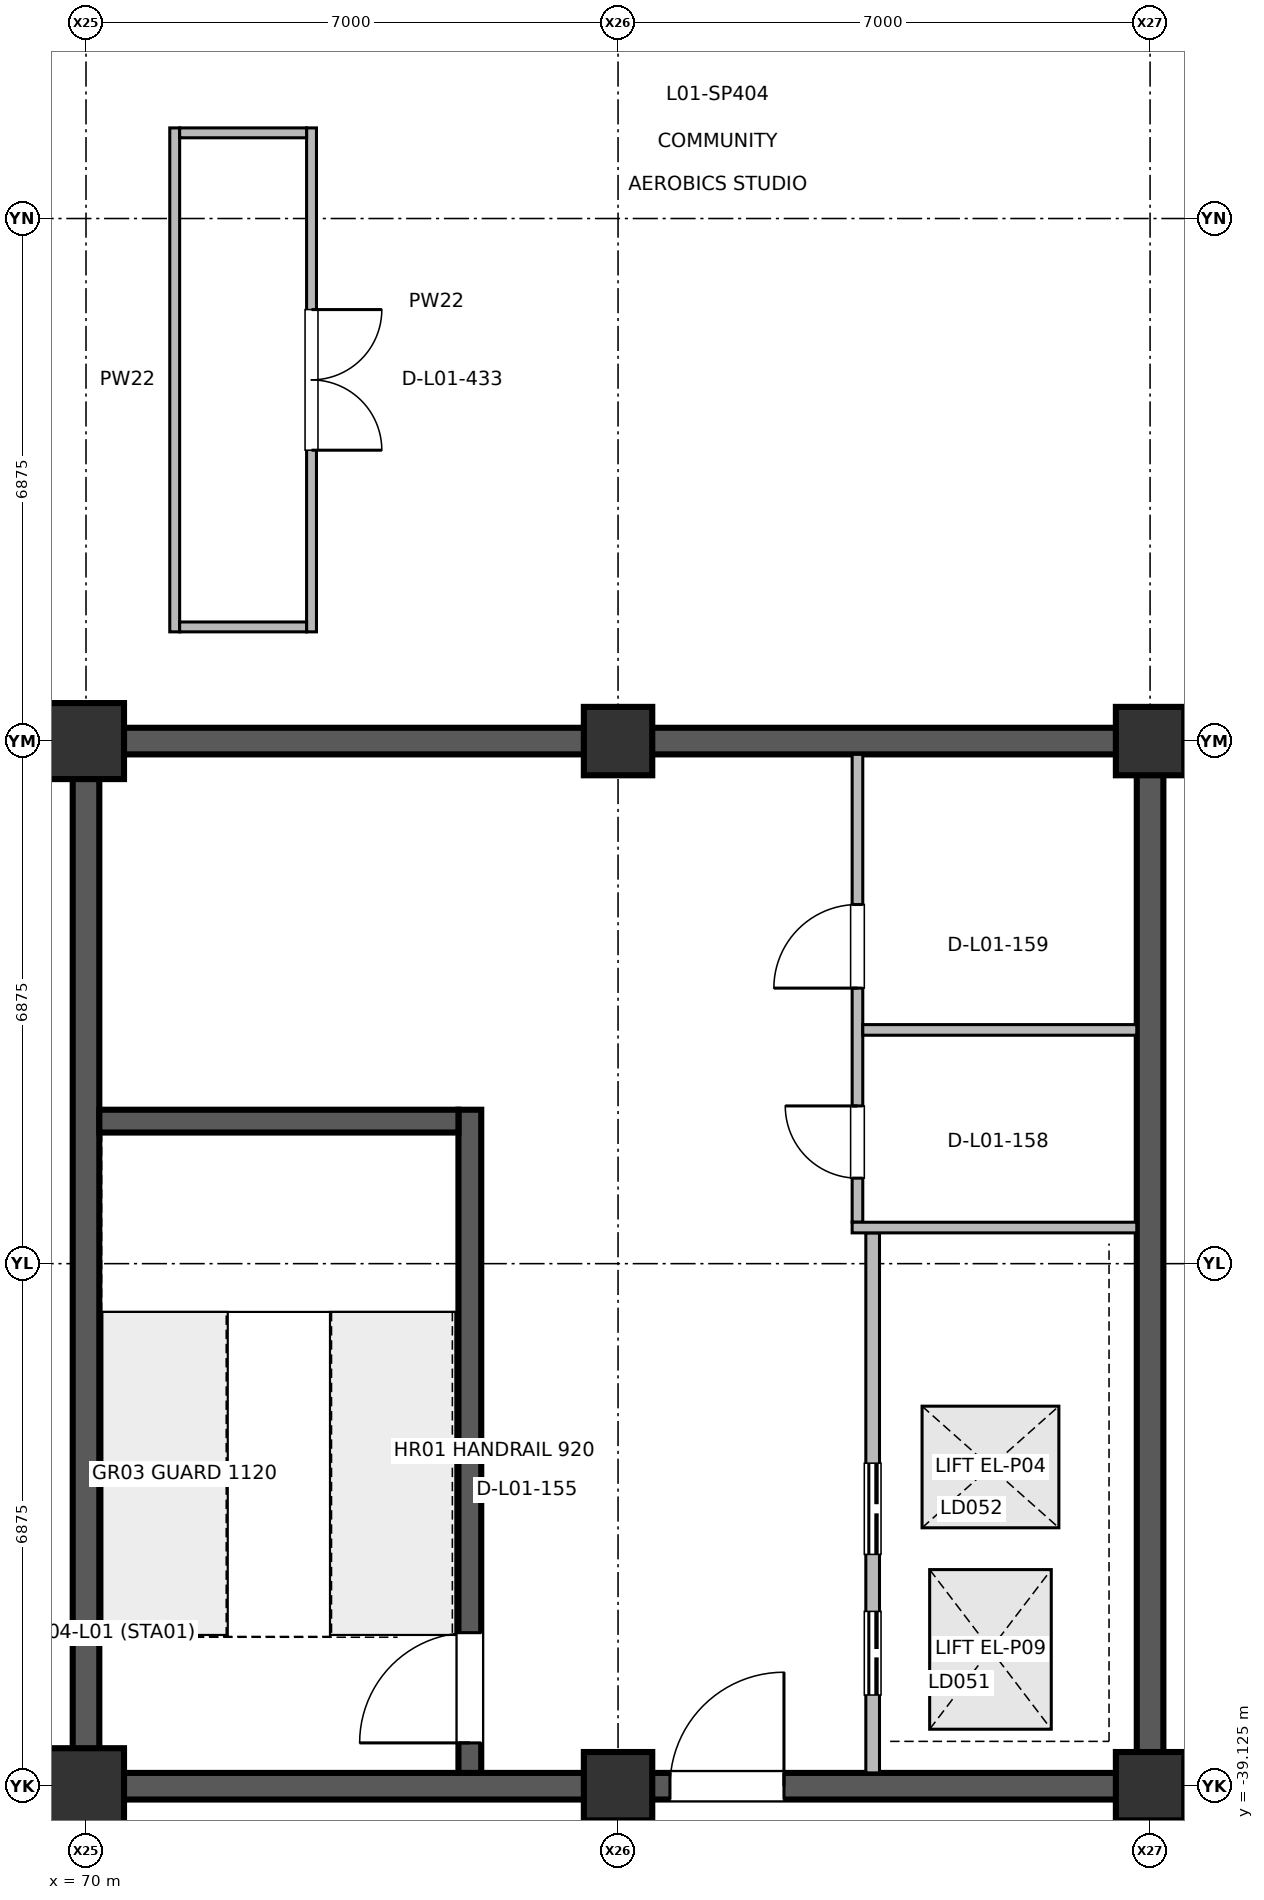
"""IFC4 building model, lengths in metres.
Left out: names, types, materials, properties, quantities, classifications, styles, units other than length and angle.
Written with IfcOpenShell. Run it as: python <this file> out.ifc"""

import sys

from ifc_helpers import new_model, si_unit, direction, frame, frame_2d, origin, origin_2d, place, context, subcontext, project, spatial, rectangle, extrude, element, fill, save


model = new_model("IFC4")
c1 = context("Model", 3, precision=1e-05, world=origin(), true_north=direction((0.0, 1.0)))
c2 = subcontext(c1, "Body", "Model", "MODEL_VIEW")
j1 = project(units=[si_unit("LENGTHUNIT", "METRE"), si_unit("PLANEANGLEUNIT", "RADIAN")], contexts=[c1])
p1 = place(None, origin())
s1 = spatial("IfcSite", under=j1, at=p1, CompositionType="ELEMENT")
p2 = place(p1, origin())
s2 = spatial("IfcBuilding", under=s1, at=p2, CompositionType="ELEMENT")
p3 = place(p2, origin())
s3 = spatial("IfcBuildingStorey", under=s2, at=p3, CompositionType="ELEMENT", Elevation=0.0)
for number, where, z_axis, x_axis in (
    (1, (70.0, -39.125, 0.0), (0.0, 0.0, 1.0), (1.0, 0.0, 0.0)),
    (2, (70.0, -25.375, 0.0), (0.0, 0.0, 1.0), (1.0, 0.0, 0.0)),
):
    element("IfcColumn", number, at=place(p3, frame(where, z_axis=z_axis, x_axis=x_axis)), inside=s3, PredefinedType="COLUMN", context=c2, shape_type="SweptSolid", body=[
        extrude(rectangle(XDim=1.0, YDim=1.0, at=origin_2d()), origin(), (0.0, 0.0, 1.0), 5.998),
    ])
for number, where, z_axis, x_axis in (
    (3, (77.0, -39.125, 0.0), (0.0, 0.0, 1.0), (1.0, 0.0, 0.0)),
    (4, (77.0, -25.375, 0.0), (0.0, 0.0, 1.0), (1.0, 0.0, 0.0)),
    (5, (84.0, -39.125, 0.0), (0.0, 0.0, 1.0), (1.0, 0.0, 0.0)),
    (6, (84.0, -25.375, 0.0), (0.0, 0.0, 1.0), (1.0, 0.0, 0.0)),
):
    element("IfcColumn", number, at=place(p3, frame(where, z_axis=z_axis, x_axis=x_axis)), inside=s3, PredefinedType="COLUMN", context=c2, shape_type="SweptSolid", body=[
        extrude(rectangle(XDim=0.9, YDim=0.9, at=origin_2d()), origin(), (0.0, 0.0, 1.0), 5.998),
    ])
for number, where, z_axis, x_axis in (
    (7, (70.0, -38.95, 0.0), (0.0, 0.0, 1.0), (0.0, 1.0, 0.0)),
    (8, (84.0, -38.95, 0.0), (0.0, 0.0, 1.0), (0.0, 1.0, 0.0)),
):
    element("IfcWall", number, at=place(p3, frame(where, z_axis=z_axis, x_axis=x_axis)), inside=s3, PredefinedType="SHEAR", context=c2, shape_type="SweptSolid", body=[
        extrude(rectangle(XDim=13.4, YDim=0.35, at=frame_2d((6.7, 0.0))), origin(), (0.0, 0.0, 1.0), 5.75),
    ])
p4 = place(p3, frame((70.175, -39.125, 0.0), z_axis=(0.0, 0.0, 1.0), x_axis=(1.0, 0.0, 0.0)))
e9 = element("IfcWall", 9, at=p4, inside=s3, PredefinedType="SHEAR", context=c2, shape_type="SweptSolid", body=[
    extrude(rectangle(XDim=13.65, YDim=0.35, at=frame_2d((6.825, 0.0))), origin(), (0.0, 0.0, 1.0), 5.75),
])
p5 = place(p4, frame((7.508, 0.0, 0.0)))
e10 = element("IfcOpeningElement", 10, at=p5, cuts=e9, PredefinedType="OPENING", context=c2, shape_type="SweptSolid", body=[
    extrude(rectangle(XDim=1.5, YDim=2.2, at=frame_2d((0.75, 1.1))), frame((0.0, 0.185, 0.0), z_axis=(0.0, -1.0, 0.0), x_axis=(1.0, 0.0, 0.0)), (0.0, 0.0, 1.0), 0.37),
])
p6 = place(p3, frame((70.175, -25.375, 0.0), z_axis=(0.0, 0.0, 1.0), x_axis=(1.0, 0.0, 0.0)))
e11 = element("IfcWall", 11, at=p6, inside=s3, PredefinedType="SHEAR", context=c2, shape_type="SweptSolid", body=[
    extrude(rectangle(XDim=13.65, YDim=0.35, at=frame_2d((6.825, 0.0))), origin(), (0.0, 0.0, 1.0), 5.75),
])
p7 = place(p3, frame((75.05, -38.95, 0.0), z_axis=(0.0, 0.0, 1.0), x_axis=(0.0, 1.0, 0.0)))
e12 = element("IfcWall", 12, at=p7, inside=s3, PredefinedType="SHEAR", context=c2, shape_type="SweptSolid", body=[
    extrude(rectangle(XDim=8.725, YDim=0.3, at=frame_2d((4.362, 0.0))), origin(), (0.0, 0.0, 1.0), 5.75),
])
p8 = place(p7, frame((0.395, 0.0, 0.0)))
e13 = element("IfcOpeningElement", 13, at=p8, cuts=e12, PredefinedType="OPENING", context=c2, shape_type="SweptSolid", body=[
    extrude(rectangle(XDim=1.45, YDim=2.2, at=frame_2d((0.725, 1.1))), frame((0.0, 0.16, 0.0), z_axis=(0.0, -1.0, 0.0), x_axis=(1.0, 0.0, 0.0)), (0.0, 0.0, 1.0), 0.32),
])
p9 = place(p3, frame((80.35, -38.95, 0.0), z_axis=(0.0, 0.0, 1.0), x_axis=(0.0, 1.0, 0.0)))
e14 = element("IfcWall", 14, at=p9, inside=s3, PredefinedType="PARTITIONING", context=c2, shape_type="SweptSolid", body=[
    extrude(rectangle(XDim=7.105, YDim=0.18, at=frame_2d((3.552, 0.0))), origin(), (0.0, 0.0, 1.0), 5.02),
])
p10 = place(p9, frame((1.025, 0.0, 0.0)))
e15 = element("IfcOpeningElement", 15, at=p10, cuts=e14, PredefinedType="OPENING", context=c2, shape_type="SweptSolid", body=[
    extrude(rectangle(XDim=1.1, YDim=2.2, at=frame_2d((0.55, 1.1))), frame((0.0, 0.1, 0.0), z_axis=(0.0, -1.0, 0.0), x_axis=(1.0, 0.0, 0.0)), (0.0, 0.0, 1.0), 0.2),
])
p11 = place(p9, frame((2.875, 0.0, 0.0)))
e16 = element("IfcOpeningElement", 16, at=p11, cuts=e14, PredefinedType="OPENING", context=c2, shape_type="SweptSolid", body=[
    extrude(rectangle(XDim=1.2, YDim=2.25, at=frame_2d((0.6, 1.125))), frame((0.0, 0.1, 0.0), z_axis=(0.0, -1.0, 0.0), x_axis=(1.0, 0.0, 0.0)), (0.0, 0.0, 1.0), 0.2),
])
p12 = place(p3, frame((80.15, -31.705, 0.0), z_axis=(0.0, 0.0, 1.0), x_axis=(0.0, 1.0, 0.0)))
e17 = element("IfcWall", 17, at=p12, inside=s3, PredefinedType="PARTITIONING", context=c2, shape_type="SweptSolid", body=[
    extrude(rectangle(XDim=6.155, YDim=0.14, at=frame_2d((3.078, 0.0))), origin(), (0.0, 0.0, 1.0), 5.02),
])
p13 = place(p12, frame((0.58, 0.0, 0.0)))
e18 = element("IfcOpeningElement", 18, at=p13, cuts=e17, PredefinedType="OPENING", context=c2, shape_type="SweptSolid", body=[
    extrude(rectangle(XDim=0.95, YDim=2.15, at=frame_2d((0.475, 1.075))), frame((0.0, 0.08, 0.0), z_axis=(0.0, -1.0, 0.0), x_axis=(1.0, 0.0, 0.0)), (0.0, 0.0, 1.0), 0.16),
])
p14 = place(p12, frame((3.08, 0.0, 0.0)))
e19 = element("IfcOpeningElement", 19, at=p14, cuts=e17, PredefinedType="OPENING", context=c2, shape_type="SweptSolid", body=[
    extrude(rectangle(XDim=1.1, YDim=2.15, at=frame_2d((0.55, 1.075))), frame((0.0, 0.08, 0.0), z_axis=(0.0, -1.0, 0.0), x_axis=(1.0, 0.0, 0.0)), (0.0, 0.0, 1.0), 0.16),
])
p15 = place(p3, frame((72.967, -17.308, 0.0), z_axis=(0.0, 0.0, 1.0), x_axis=(0.0, -1.0, 0.0)))
e20 = element("IfcWall", 20, at=p15, inside=s3, PredefinedType="PARTITIONING", context=c2, shape_type="SweptSolid", body=[
    extrude(rectangle(XDim=6.63, YDim=0.13, at=frame_2d((3.315, 0.0))), origin(), (0.0, 0.0, 1.0), 5.02),
])
p16 = place(p15, frame((2.39, 0.0, 0.0)))
e21 = element("IfcOpeningElement", 21, at=p16, cuts=e20, PredefinedType="OPENING", context=c2, shape_type="SweptSolid", body=[
    extrude(rectangle(XDim=1.85, YDim=2.4, at=frame_2d((0.925, 1.2))), frame((0.0, 0.075, 0.0), z_axis=(0.0, -1.0, 0.0), x_axis=(1.0, 0.0, 0.0)), (0.0, 0.0, 1.0), 0.15),
])
p17 = place(p3, frame((80.08, -31.775, 0.0), z_axis=(0.0, 0.0, 1.0), x_axis=(1.0, 0.0, 0.0)))
e22 = element("IfcWall", 22, at=p17, inside=s3, PredefinedType="PARTITIONING", context=c2, shape_type="SweptSolid", body=[
    extrude(rectangle(XDim=3.745, YDim=0.14, at=frame_2d((1.873, 0.0))), origin(), (0.0, 0.0, 1.0), 5.02),
])
p18 = place(p3, frame((80.22, -29.175, 0.0), z_axis=(0.0, 0.0, 1.0), x_axis=(1.0, 0.0, 0.0)))
e23 = element("IfcWall", 23, at=p18, inside=s3, PredefinedType="PARTITIONING", context=c2, shape_type="SweptSolid", body=[
    extrude(rectangle(XDim=3.605, YDim=0.14, at=frame_2d((1.802, 0.0))), origin(), (0.0, 0.0, 1.0), 5.02),
])
p19 = place(p3, frame((71.167, -23.938, 0.0), z_axis=(0.0, 0.0, 1.0), x_axis=(0.0, 1.0, 0.0)))
e24 = element("IfcWall", 24, at=p19, inside=s3, PredefinedType="PARTITIONING", context=c2, shape_type="SweptSolid", body=[
    extrude(rectangle(XDim=6.63, YDim=0.13, at=frame_2d((3.315, 0.0))), origin(), (0.0, 0.0, 1.0), 5.02),
])
for number, where, z_axis, x_axis in (
    (25, (71.232, -23.873, 0.0), (0.0, 0.0, 1.0), (1.0, 0.0, 0.0)),
    (26, (71.232, -17.373, 0.0), (0.0, 0.0, 1.0), (1.0, 0.0, 0.0)),
):
    element("IfcWall", number, at=place(p3, frame(where, z_axis=z_axis, x_axis=x_axis)), inside=s3, PredefinedType="PARTITIONING", context=c2, shape_type="SweptSolid", body=[
        extrude(rectangle(XDim=1.67, YDim=0.13, at=frame_2d((0.835, 0.0))), origin(), (0.0, 0.0, 1.0), 5.02),
    ])
p20 = place(p3, frame((70.175, -30.375, 0.0), z_axis=(0.0, 0.0, 1.0), x_axis=(1.0, 0.0, 0.0)))
e27 = element("IfcWall", 27, at=p20, inside=s3, PredefinedType="SHEAR", context=c2, shape_type="SweptSolid", body=[
    extrude(rectangle(XDim=4.725, YDim=0.3, at=frame_2d((2.362, 0.0))), origin(), (0.0, 0.0, 1.0), 5.75),
])
p21 = place(p5, origin())
e28 = element("IfcDoor", 28, at=p21, inside=s3, OperationType="SINGLE_SWING_RIGHT", PredefinedType="DOOR", context=c2, shape_type="SweptSolid", body=[
    extrude(rectangle(XDim=1.5, YDim=2.2, at=frame_2d((0.75, 1.1))), frame((0.0, 0.025, 0.0), z_axis=(0.0, -1.0, 0.0), x_axis=(1.0, 0.0, 0.0)), (0.0, 0.0, 1.0), 0.05),
])
fill(e10, e28)
p22 = place(p8, origin())
e29 = element("IfcDoor", 29, at=p22, inside=s3, OperationType="SINGLE_SWING_LEFT", PredefinedType="DOOR", context=c2, shape_type="SweptSolid", body=[
    extrude(rectangle(XDim=1.45, YDim=2.2, at=frame_2d((0.725, 1.1))), frame((0.0, 0.025, 0.0), z_axis=(0.0, -1.0, 0.0), x_axis=(1.0, 0.0, 0.0)), (0.0, 0.0, 1.0), 0.05),
])
fill(e13, e29)
p23 = place(p10, origin())
e30 = element("IfcDoor", 30, at=p23, inside=s3, OperationType="DOUBLE_DOOR_SLIDING", PredefinedType="DOOR", context=c2, shape_type="SweptSolid", body=[
    extrude(rectangle(XDim=1.1, YDim=2.2, at=frame_2d((0.55, 1.1))), frame((0.0, 0.025, 0.0), z_axis=(0.0, -1.0, 0.0), x_axis=(1.0, 0.0, 0.0)), (0.0, 0.0, 1.0), 0.05),
])
fill(e15, e30)
p24 = place(p11, origin())
e31 = element("IfcDoor", 31, at=p24, inside=s3, OperationType="DOUBLE_DOOR_SLIDING", PredefinedType="DOOR", context=c2, shape_type="SweptSolid", body=[
    extrude(rectangle(XDim=1.2, YDim=2.25, at=frame_2d((0.6, 1.125))), frame((0.0, 0.025, 0.0), z_axis=(0.0, -1.0, 0.0), x_axis=(1.0, 0.0, 0.0)), (0.0, 0.0, 1.0), 0.05),
])
fill(e16, e31)
p25 = place(p13, origin())
e32 = element("IfcDoor", 32, at=p25, inside=s3, OperationType="SINGLE_SWING_RIGHT", PredefinedType="DOOR", context=c2, shape_type="SweptSolid", body=[
    extrude(rectangle(XDim=0.95, YDim=2.15, at=frame_2d((0.475, 1.075))), frame((0.0, 0.025, 0.0), z_axis=(0.0, -1.0, 0.0), x_axis=(1.0, 0.0, 0.0)), (0.0, 0.0, 1.0), 0.05),
])
fill(e18, e32)
p26 = place(p14, origin())
e33 = element("IfcDoor", 33, at=p26, inside=s3, OperationType="SINGLE_SWING_LEFT", PredefinedType="DOOR", context=c2, shape_type="SweptSolid", body=[
    extrude(rectangle(XDim=1.1, YDim=2.15, at=frame_2d((0.55, 1.075))), frame((0.0, 0.025, 0.0), z_axis=(0.0, -1.0, 0.0), x_axis=(1.0, 0.0, 0.0)), (0.0, 0.0, 1.0), 0.05),
])
fill(e19, e33)
p27 = place(p16, origin())
e34 = element("IfcDoor", 34, at=p27, inside=s3, OperationType="DOUBLE_DOOR_SINGLE_SWING", PredefinedType="DOOR", context=c2, shape_type="SweptSolid", body=[
    extrude(rectangle(XDim=1.85, YDim=2.4, at=frame_2d((0.925, 1.2))), frame((0.0, 0.025, 0.0), z_axis=(0.0, -1.0, 0.0), x_axis=(1.0, 0.0, 0.0)), (0.0, 0.0, 1.0), 0.05),
])
fill(e21, e34)
save(model, sys.argv[1])
